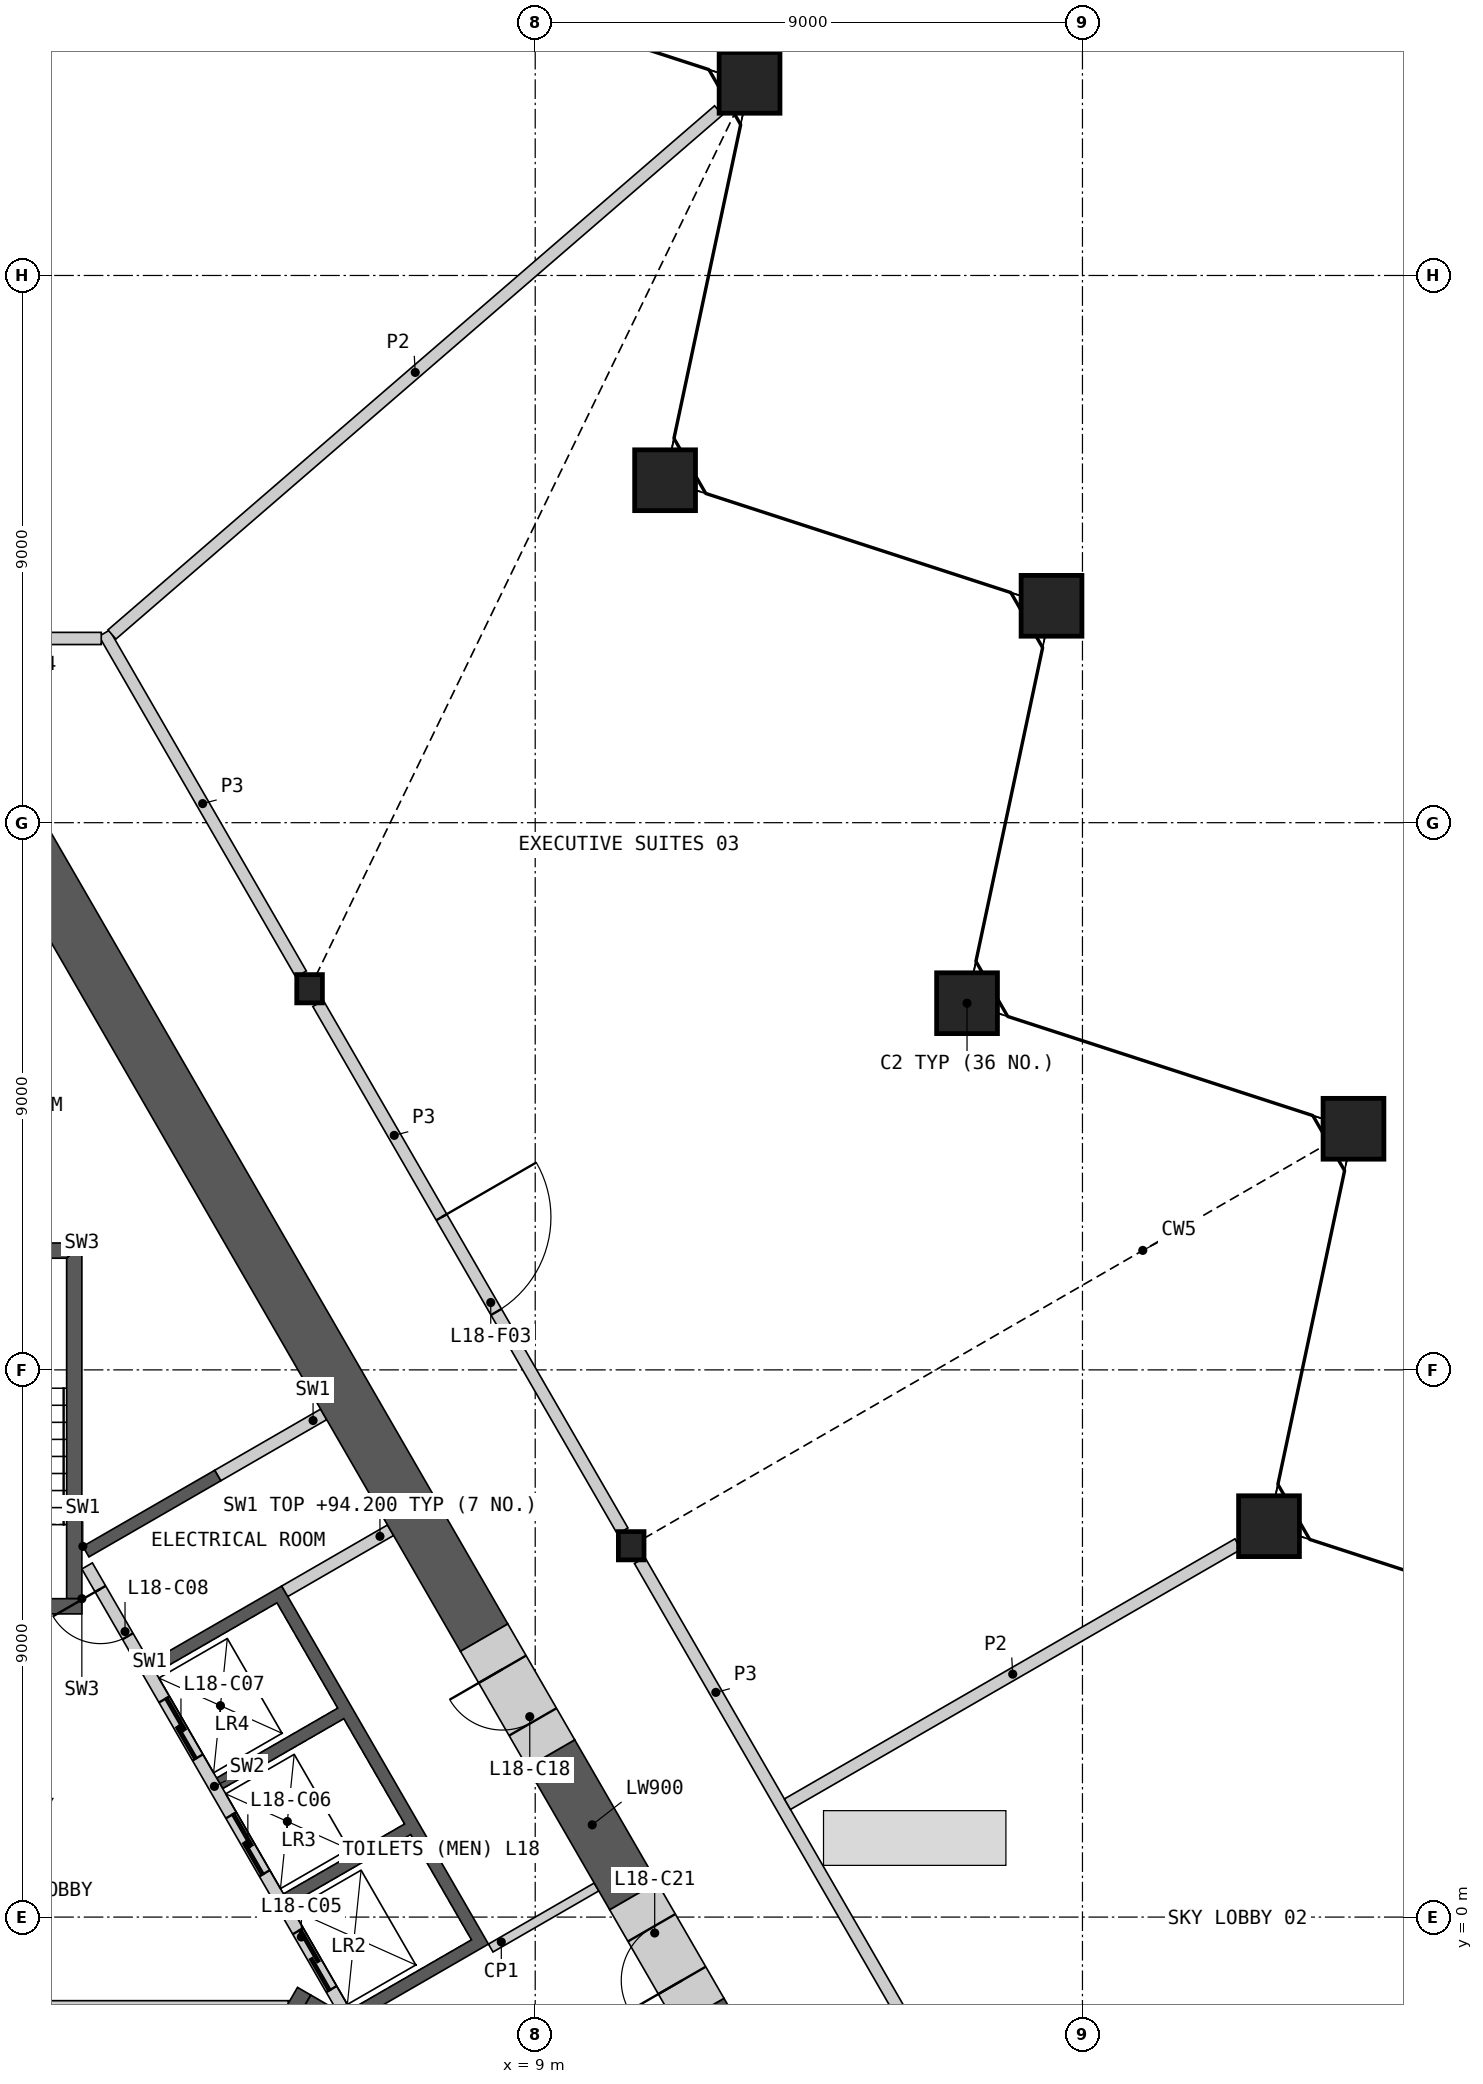
"""IFC4 building model, lengths in metres.
Left out: names, types, materials, properties, quantities, classifications, styles, units other than length and angle.
Written with IfcOpenShell. Run it as: python <this file> out.ifc"""

import sys

from ifc_helpers import new_model, si_unit, direction, frame, frame_2d, origin, origin_2d, place, context, subcontext, project, spatial, polyline, rectangle, hollow_rectangle, i_section, outline, extrude, element, fill, save


model = new_model("IFC4")
c1 = context("Model", 3, precision=1e-05, world=origin(), true_north=direction((0.0, 1.0)))
c2 = subcontext(c1, "Body", "Model", "MODEL_VIEW")
j1 = project(units=[si_unit("LENGTHUNIT", "METRE"), si_unit("PLANEANGLEUNIT", "RADIAN")], contexts=[c1])
p1 = place(None, origin())
s1 = spatial("IfcSite", under=j1, at=p1, CompositionType="ELEMENT")
p2 = place(p1, origin())
s2 = spatial("IfcBuilding", under=s1, at=p2, CompositionType="ELEMENT")
p3 = place(p2, frame((0.0, 0.0, 84.6)))
s3 = spatial("IfcBuildingStorey", under=s2, at=p3, CompositionType="ELEMENT", Elevation=84.6)
for number, where, z_axis, x_axis in (
    (1, (21.068, 6.429, 0.0), (0.0, 0.0, 1.0), (1.0, 0.0, 0.0)),
    (2, (22.457, 12.966, 0.0), (0.0, 0.0, 1.0), (1.0, 0.0, 0.0)),
    (3, (16.102, 15.031, 0.0), (0.0, 0.0, 1.0), (1.0, 0.0, 0.0)),
    (4, (17.491, 21.567, 0.0), (0.0, 0.0, 1.0), (1.0, 0.0, 0.0)),
    (5, (11.136, 23.632, 0.0), (0.0, 0.0, 1.0), (1.0, 0.0, 0.0)),
    (6, (12.525, 30.169, 0.0), (0.0, 0.0, 1.0), (1.0, 0.0, 0.0)),
):
    element("IfcColumn", number, at=place(p3, frame(where, z_axis=z_axis, x_axis=x_axis)), inside=s3, PredefinedType="COLUMN", context=c2, shape_type="SweptSolid", body=[
        extrude(hollow_rectangle(XDim=1.0, YDim=1.0, WallThickness=0.07, at=origin_2d()), origin(), (0.0, 0.0, 1.0), 10.0),
    ])
for number, where, z_axis, x_axis in (
    (7, (10.578, 6.107, 0.0), (0.0, 0.0, 1.0), (1.0, 0.0, 0.0)),
    (8, (5.289, 15.269, 0.0), (0.0, 0.0, 1.0), (1.0, 0.0, 0.0)),
):
    element("IfcColumn", number, at=place(p3, frame(where, z_axis=z_axis, x_axis=x_axis)), inside=s3, PredefinedType="COLUMN", context=c2, shape_type="SweptSolid", body=[
        extrude(i_section(OverallWidth=0.421, OverallDepth=0.465, WebThickness=0.045, FlangeThickness=0.072, at=origin_2d()), origin(), (0.0, 0.0, 1.0), 10.0),
    ])
p4 = place(p3, origin())
e9 = element("IfcWall", 9, at=p4, inside=s3, PredefinedType="SHEAR", context=c2, shape_type="SweptSolid", body=[
    extrude(outline(polyline([(1.561, 6.097), (3.731, 7.35), (3.831, 7.177), (1.66, 5.924), (1.561, 6.097)])), origin(), (0.0, 0.0, 1.0), 9.6),
])
p5 = place(p3, origin())
e10 = element("IfcWall", 10, at=p5, inside=s3, PredefinedType="SHEAR", context=c2, shape_type="SweptSolid", body=[
    extrude(outline(polyline([(2.66, 4.192), (4.831, 5.445), (8.231, -0.444), (6.061, -1.697), (5.96, -1.524), (7.952, -0.374), (6.952, 1.358), (4.96, 0.208), (4.861, 0.381), (6.852, 1.531), (5.852, 3.263), (3.861, 2.113), (3.76, 2.287), (5.752, 3.437), (4.752, 5.169), (2.76, 4.019), (2.66, 4.192)])), origin(), (0.0, 0.0, 1.0), 9.6),
])
p6 = place(p3, frame((5.817, -1.476, 0.0), z_axis=(0.0, 0.0, 1.0), x_axis=(-0.500002616675, 0.866023893041, 0.0)))
e11 = element("IfcWall", 11, at=p6, inside=s3, PredefinedType="SOLIDWALL", context=c2, shape_type="SweptSolid", body=[
    extrude(rectangle(XDim=8.373, YDim=0.2, at=frame_2d((4.187, 0.0))), origin(), (0.0, 0.0, 1.0), 9.6),
])
p7 = place(p6, frame((0.337, 0.0, 0.0)))
e12 = element("IfcOpeningElement", 12, at=p7, cuts=e11, PredefinedType="OPENING", context=c2, shape_type="SweptSolid", body=[
    extrude(rectangle(XDim=1.1, YDim=2.1, at=frame_2d((0.55, 1.05))), frame((0.0, 0.11, 0.0), z_axis=(0.0, -1.0, 0.0), x_axis=(1.0, 0.0, 0.0)), (0.0, 0.0, 1.0), 0.22),
])
p8 = place(p6, frame((2.537, 0.0, 0.0)))
e13 = element("IfcOpeningElement", 13, at=p8, cuts=e11, PredefinedType="OPENING", context=c2, shape_type="SweptSolid", body=[
    extrude(rectangle(XDim=1.1, YDim=2.1, at=frame_2d((0.55, 1.05))), frame((0.0, 0.11, 0.0), z_axis=(0.0, -1.0, 0.0), x_axis=(1.0, 0.0, 0.0)), (0.0, 0.0, 1.0), 0.22),
])
p9 = place(p6, frame((4.737, 0.0, 0.0)))
e14 = element("IfcOpeningElement", 14, at=p9, cuts=e11, PredefinedType="OPENING", context=c2, shape_type="SweptSolid", body=[
    extrude(rectangle(XDim=1.1, YDim=2.1, at=frame_2d((0.55, 1.05))), frame((0.0, 0.11, 0.0), z_axis=(0.0, -1.0, 0.0), x_axis=(1.0, 0.0, 0.0)), (0.0, 0.0, 1.0), 0.22),
])
p10 = place(p6, frame((7.037, 0.0, 0.0)))
e15 = element("IfcOpeningElement", 15, at=p10, cuts=e11, PredefinedType="OPENING", context=c2, shape_type="SweptSolid", body=[
    extrude(rectangle(XDim=0.9, YDim=2.1, at=frame_2d((0.45, 1.05))), frame((0.0, 0.11, 0.0), z_axis=(0.0, -1.0, 0.0), x_axis=(1.0, 0.0, 0.0)), (0.0, 0.0, 1.0), 0.22),
])
p11 = place(p3, frame((4.881, 5.358, 0.0), z_axis=(0.0, 0.0, 1.0), x_axis=(0.866035824272, 0.499981950752, 0.0)))
e16 = element("IfcWall", 16, at=p11, inside=s3, PredefinedType="SHEAR", context=c2, shape_type="SweptSolid", body=[
    extrude(rectangle(XDim=2.009, YDim=0.2, at=frame_2d((1.004, 0.0))), origin(), (0.0, 0.0, 1.0), 9.6),
])
p12 = place(p3, frame((3.781, 7.263, 0.0), z_axis=(0.0, 0.0, 1.0), x_axis=(0.865983199114, 0.50007309351, 0.0)))
e17 = element("IfcWall", 17, at=p12, inside=s3, PredefinedType="SHEAR", context=c2, shape_type="SweptSolid", body=[
    extrude(rectangle(XDim=2.009, YDim=0.2, at=frame_2d((1.004, 0.0))), origin(), (0.0, 0.0, 1.0), 9.6),
])
p13 = place(p3, frame((-4.941, -1.45, 0.0), z_axis=(0.0, 0.0, 1.0), x_axis=(1.0, 0.0, 0.0)))
e18 = element("IfcWall", 18, at=p13, inside=s3, PredefinedType="PARTITIONING", context=c2, shape_type="SweptSolid", body=[
    extrude(rectangle(XDim=9.882, YDim=0.15, at=frame_2d((4.941, 0.0))), origin(), (0.0, 0.0, 1.0), 9.6),
])
p14 = place(p13, frame((4.391, 0.0, 0.0)))
e19 = element("IfcOpeningElement", 19, at=p14, cuts=e18, PredefinedType="OPENING", context=c2, shape_type="SweptSolid", body=[
    extrude(rectangle(XDim=1.1, YDim=2.1, at=frame_2d((0.55, 1.05))), frame((0.0, 0.085, 0.0), z_axis=(0.0, -1.0, 0.0), x_axis=(1.0, 0.0, 0.0)), (0.0, 0.0, 1.0), 0.17),
])
p15 = place(p3, origin())
e20 = element("IfcWall", 20, at=p15, inside=s3, PredefinedType="SHEAR", context=c2, shape_type="SweptSolid", body=[
    extrude(outline(polyline([(10.032, -4.298), (10.374, -4.206), (5.307, -1.281), (5.182, -1.498), (10.032, -4.298)])), origin(), (0.0, 0.0, 1.0), 9.6),
])
p16 = place(p3, frame((3.655, -3.893, 0.0), z_axis=(0.0, 0.0, 1.0), x_axis=(0.499982516597, 0.866035497597, 0.0)))
e21 = element("IfcWall", 21, at=p16, inside=s3, PredefinedType="SHEAR", context=c2, shape_type="SweptSolid", body=[
    extrude(rectangle(XDim=3.088, YDim=0.25, at=frame_2d((1.544, 0.0))), origin(), (0.0, 0.0, 1.0), 9.6),
])
p17 = place(p16, frame((0.994, 0.0, 0.0)))
e22 = element("IfcOpeningElement", 22, at=p17, cuts=e21, PredefinedType="OPENING", context=c2, shape_type="SweptSolid", body=[
    extrude(rectangle(XDim=1.1, YDim=2.1, at=frame_2d((0.55, 1.05))), frame((0.0, 0.135, 0.0), z_axis=(0.0, -1.0, 0.0), x_axis=(1.0, 0.0, 0.0)), (0.0, 0.0, 1.0), 0.27),
])
p18 = place(p3, origin())
e23 = element("IfcWall", 23, at=p18, inside=s3, PredefinedType="SHEAR", context=c2, shape_type="SweptSolid", body=[
    extrude(outline(polyline([(1.544, 5.237), (1.544, 11.087), (1.294, 10.837), (1.294, 5.237), (1.544, 5.237)])), origin(), (0.0, 0.0, 1.0), 9.6),
])
p19 = place(p3, origin())
e24 = element("IfcWall", 24, at=p19, inside=s3, PredefinedType="SHEAR", context=c2, shape_type="SweptSolid", body=[
    extrude(outline(polyline([(1.544, 11.087), (-1.544, 11.087), (-1.294, 10.837), (1.294, 10.837), (1.544, 11.087)])), origin(), (0.0, 0.0, 1.0), 9.6),
])
p20 = place(p3, frame((1.544, 5.112, 0.0), z_axis=(0.0, 0.0, 1.0), x_axis=(-1.0, 0.0, 0.0)))
e25 = element("IfcWall", 25, at=p20, inside=s3, PredefinedType="SHEAR", context=c2, shape_type="SweptSolid", body=[
    extrude(rectangle(XDim=3.088, YDim=0.25, at=frame_2d((1.544, 0.0))), origin(), (0.0, 0.0, 1.0), 9.6),
])
p21 = place(p20, frame((0.994, 0.0, 0.0)))
e26 = element("IfcOpeningElement", 26, at=p21, cuts=e25, PredefinedType="OPENING", context=c2, shape_type="SweptSolid", body=[
    extrude(rectangle(XDim=1.1, YDim=2.1, at=frame_2d((0.55, 1.05))), frame((0.0, 0.135, 0.0), z_axis=(0.0, -1.0, 0.0), x_axis=(1.0, 0.0, 0.0)), (0.0, 0.0, 1.0), 0.27),
])
p22 = place(p3, frame((8.268, -0.509, 0.0), z_axis=(0.0, 0.0, 1.0), x_axis=(0.866035824272, 0.499981950752, 0.0)))
e27 = element("IfcWall", 27, at=p22, inside=s3, PredefinedType="PARTITIONING", context=c2, shape_type="SweptSolid", body=[
    extrude(rectangle(XDim=2.009, YDim=0.15, at=frame_2d((1.004, 0.0))), origin(), (0.0, 0.0, 1.0), 9.6),
])
p23 = place(p3, frame((8.16, 4.596, 0.0), z_axis=(0.0, 0.0, 1.0), x_axis=(-0.500009830349, 0.866019728156, 0.0)))
e28 = element("IfcWall", 28, at=p23, inside=s3, PredefinedType="SHEAR", context=c2, shape_type="SweptSolid", body=[
    extrude(rectangle(XDim=15.541, YDim=0.9, at=frame_2d((7.771, 0.0))), origin(), (0.0, 0.0, 1.0), 9.6),
])
p24 = place(p3, frame((15.831, -8.69, 0.0), z_axis=(0.0, 0.0, 1.0), x_axis=(-0.499995435471, 0.8660280391, 0.0)))
e29 = element("IfcWall", 29, at=p24, inside=s3, PredefinedType="SHEAR", context=c2, shape_type="SweptSolid", body=[
    extrude(rectangle(XDim=8.232, YDim=0.9, at=frame_2d((4.116, 0.0))), origin(), (0.0, 0.0, 1.0), 9.6),
])
p25 = place(p3, frame((10.615, 0.344, 0.0), z_axis=(0.0, 0.0, 1.0), x_axis=(-0.500044870432, 0.865999496279, 0.0)))
e30 = element("IfcWall", 30, at=p25, inside=s3, PredefinedType="SHEAR", context=c2, shape_type="SweptSolid", body=[
    extrude(rectangle(XDim=2.709, YDim=0.9, at=frame_2d((1.354, 0.0))), origin(), (0.0, 0.0, 1.0), 9.6),
])
p26 = place(p3, frame((9.26, 2.691, 0.0), z_axis=(0.0, 0.0, 1.0), x_axis=(-0.499946605688, 0.86605622881, 0.0)))
e31 = element("IfcWall", 31, at=p26, inside=s3, PredefinedType="SHEAR", context=c2, shape_type="SweptSolid", body=[
    extrude(rectangle(XDim=2.2, YDim=0.9, at=frame_2d((1.1, 0.0))), origin(), (0.0, 0.0, 1.0), 9.6),
])
p27 = place(p26, frame((0.6, 0.0, 0.0)))
e32 = element("IfcOpeningElement", 32, at=p27, cuts=e31, PredefinedType="OPENING", context=c2, shape_type="SweptSolid", body=[
    extrude(rectangle(XDim=1.0, YDim=2.1, at=frame_2d((0.5, 1.05))), frame((0.0, 0.46, 0.0), z_axis=(0.0, -1.0, 0.0), x_axis=(1.0, 0.0, 0.0)), (0.0, 0.0, 1.0), 0.92),
])
p28 = place(p3, frame((11.715, -1.561, 0.0), z_axis=(0.0, 0.0, 1.0), x_axis=(-0.499946605688, 0.86605622881, 0.0)))
e33 = element("IfcWall", 33, at=p28, inside=s3, PredefinedType="SHEAR", context=c2, shape_type="SweptSolid", body=[
    extrude(rectangle(XDim=2.2, YDim=0.9, at=frame_2d((1.1, 0.0))), origin(), (0.0, 0.0, 1.0), 9.6),
])
p29 = place(p28, frame((0.6, 0.0, 0.0)))
e34 = element("IfcOpeningElement", 34, at=p29, cuts=e33, PredefinedType="OPENING", context=c2, shape_type="SweptSolid", body=[
    extrude(rectangle(XDim=1.0, YDim=2.1, at=frame_2d((0.5, 1.05))), frame((0.0, 0.46, 0.0), z_axis=(0.0, -1.0, 0.0), x_axis=(1.0, 0.0, 0.0)), (0.0, 0.0, 1.0), 0.92),
])
p30 = place(p3, frame((10.719, 5.865, 0.0), z_axis=(0.0, 0.0, 1.0), x_axis=(0.49999175339, -0.866030164915, 0.0)))
e35 = element("IfcWall", 35, at=p30, inside=s3, PredefinedType="PARTITIONING", context=c2, shape_type="SweptSolid", body=[
    extrude(rectangle(XDim=10.019, YDim=0.2, at=frame_2d((5.009, 0.0))), origin(), (0.0, 0.0, 1.0), 9.6),
])
p31 = place(p3, frame((5.429, 15.026, 0.0), z_axis=(0.0, 0.0, 1.0), x_axis=(0.50001002959, -0.86601961312, 0.0)))
e36 = element("IfcWall", 36, at=p31, inside=s3, PredefinedType="PARTITIONING", context=c2, shape_type="SweptSolid", body=[
    extrude(rectangle(XDim=10.019, YDim=0.2, at=frame_2d((5.009, 0.0))), origin(), (0.0, 0.0, 1.0), 9.6),
])
p32 = place(p31, frame((4.059, 0.0, 0.0)))
e37 = element("IfcOpeningElement", 37, at=p32, cuts=e36, PredefinedType="OPENING", context=c2, shape_type="SweptSolid", body=[
    extrude(rectangle(XDim=1.8, YDim=2.1, at=frame_2d((0.9, 1.05))), frame((0.0, 0.11, 0.0), z_axis=(0.0, -1.0, 0.0), x_axis=(1.0, 0.0, 0.0)), (0.0, 0.0, 1.0), 0.22),
])
p33 = place(p3, frame((1.913, 21.116, 0.0), z_axis=(0.0, 0.0, 1.0), x_axis=(0.500001069878, -0.866024786089, 0.0)))
e38 = element("IfcWall", 38, at=p33, inside=s3, PredefinedType="PARTITIONING", context=c2, shape_type="SweptSolid", body=[
    extrude(rectangle(XDim=6.473, YDim=0.2, at=frame_2d((3.236, 0.0))), origin(), (0.0, 0.0, 1.0), 9.6),
])
p34 = place(p3, frame((-1.863, 21.03, 0.0), z_axis=(0.0, 0.0, 1.0), x_axis=(1.0, 0.0, 0.0)))
e39 = element("IfcWall", 39, at=p34, inside=s3, PredefinedType="PARTITIONING", context=c2, shape_type="SweptSolid", body=[
    extrude(rectangle(XDim=3.726, YDim=0.2, at=frame_2d((1.863, 0.0))), origin(), (0.0, 0.0, 1.0), 9.6),
])
p35 = place(p34, frame((0.963, 0.0, 0.0)))
e40 = element("IfcOpeningElement", 40, at=p35, cuts=e39, PredefinedType="OPENING", context=c2, shape_type="SweptSolid", body=[
    extrude(rectangle(XDim=1.8, YDim=2.1, at=frame_2d((0.9, 1.05))), frame((0.0, 0.11, 0.0), z_axis=(0.0, -1.0, 0.0), x_axis=(1.0, 0.0, 0.0)), (0.0, 0.0, 1.0), 0.22),
])
p36 = place(p3, frame((2.039, 21.095, 0.0), z_axis=(0.0, 0.0, 1.0), x_axis=(0.756656024203, 0.653813169826, 0.0)))
e41 = element("IfcWall", 41, at=p36, inside=s3, PredefinedType="PARTITIONING", context=c2, shape_type="SweptSolid", body=[
    extrude(rectangle(XDim=13.185, YDim=0.2, at=frame_2d((6.592, 0.0))), origin(), (0.0, 0.0, 1.0), 8.685),
])
p37 = place(p3, frame((13.148, 1.857, 0.0), z_axis=(0.0, 0.0, 1.0), x_axis=(0.86602022259, 0.500008973985, 0.0)))
e42 = element("IfcWall", 42, at=p37, inside=s3, PredefinedType="PARTITIONING", context=c2, shape_type="SweptSolid", body=[
    extrude(rectangle(XDim=8.556, YDim=0.2, at=frame_2d((4.278, 0.0))), origin(), (0.0, 0.0, 1.0), 8.685),
])
p38 = place(p7, origin())
e43 = element("IfcDoor", 43, at=p38, inside=s3, OperationType="SLIDING_TO_LEFT", PredefinedType="DOOR", context=c2, shape_type="SweptSolid", body=[
    extrude(rectangle(XDim=1.1, YDim=2.1, at=frame_2d((0.55, 1.05))), frame((0.0, 0.025, 0.0), z_axis=(0.0, -1.0, 0.0), x_axis=(1.0, 0.0, 0.0)), (0.0, 0.0, 1.0), 0.05),
])
fill(e12, e43)
p39 = place(p8, origin())
e44 = element("IfcDoor", 44, at=p39, inside=s3, OperationType="SLIDING_TO_LEFT", PredefinedType="DOOR", context=c2, shape_type="SweptSolid", body=[
    extrude(rectangle(XDim=1.1, YDim=2.1, at=frame_2d((0.55, 1.05))), frame((0.0, 0.025, 0.0), z_axis=(0.0, -1.0, 0.0), x_axis=(1.0, 0.0, 0.0)), (0.0, 0.0, 1.0), 0.05),
])
fill(e13, e44)
p40 = place(p9, origin())
e45 = element("IfcDoor", 45, at=p40, inside=s3, OperationType="SLIDING_TO_LEFT", PredefinedType="DOOR", context=c2, shape_type="SweptSolid", body=[
    extrude(rectangle(XDim=1.1, YDim=2.1, at=frame_2d((0.55, 1.05))), frame((0.0, 0.025, 0.0), z_axis=(0.0, -1.0, 0.0), x_axis=(1.0, 0.0, 0.0)), (0.0, 0.0, 1.0), 0.05),
])
fill(e14, e45)
p41 = place(p10, origin())
e46 = element("IfcDoor", 46, at=p41, inside=s3, OperationType="SINGLE_SWING_RIGHT", PredefinedType="DOOR", context=c2, shape_type="SweptSolid", body=[
    extrude(rectangle(XDim=0.9, YDim=2.1, at=frame_2d((0.45, 1.05))), frame((0.0, 0.025, 0.0), z_axis=(0.0, -1.0, 0.0), x_axis=(1.0, 0.0, 0.0)), (0.0, 0.0, 1.0), 0.05),
])
fill(e15, e46)
p42 = place(p27, origin())
e47 = element("IfcDoor", 47, at=p42, inside=s3, OperationType="SINGLE_SWING_RIGHT", PredefinedType="DOOR", context=c2, shape_type="SweptSolid", body=[
    extrude(rectangle(XDim=1.0, YDim=2.1, at=frame_2d((0.5, 1.05))), frame((0.0, 0.205, 0.0), z_axis=(0.0, -1.0, 0.0), x_axis=(1.0, 0.0, 0.0)), (0.0, 0.0, 1.0), 0.05),
])
fill(e32, e47)
p43 = place(p29, origin())
e48 = element("IfcDoor", 48, at=p43, inside=s3, OperationType="SINGLE_SWING_LEFT", PredefinedType="DOOR", context=c2, shape_type="SweptSolid", body=[
    extrude(rectangle(XDim=1.0, YDim=2.1, at=frame_2d((0.5, 1.05))), frame((0.0, 0.205, 0.0), z_axis=(0.0, -1.0, 0.0), x_axis=(1.0, 0.0, 0.0)), (0.0, 0.0, 1.0), 0.05),
])
fill(e34, e48)
p44 = place(p32, origin())
e49 = element("IfcDoor", 49, at=p44, inside=s3, OperationType="DOUBLE_DOOR_SINGLE_SWING", PredefinedType="DOOR", context=c2, shape_type="SweptSolid", body=[
    extrude(rectangle(XDim=1.8, YDim=2.1, at=frame_2d((0.9, 1.05))), frame((0.0, 0.025, 0.0), z_axis=(0.0, -1.0, 0.0), x_axis=(1.0, 0.0, 0.0)), (0.0, 0.0, 1.0), 0.05),
])
fill(e37, e49)
save(model, sys.argv[1])
